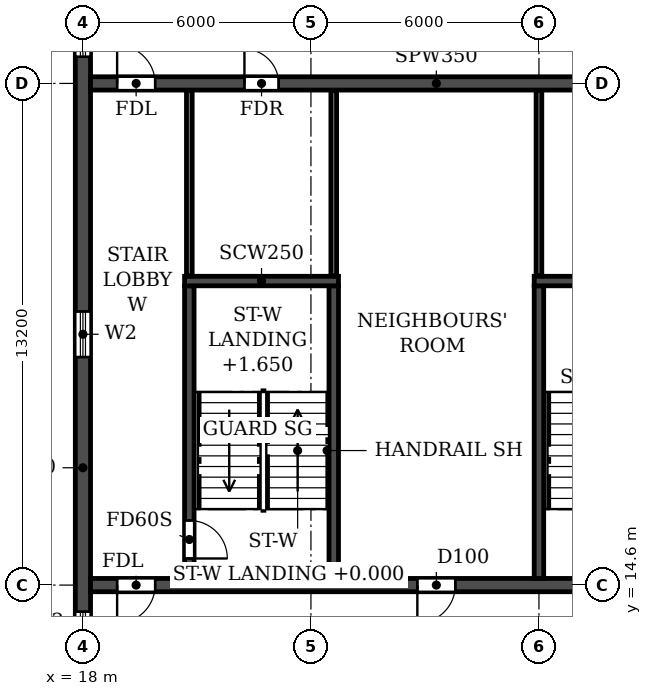
"""IFC4 building model, lengths in metres.
Left out: names, types, materials, properties, quantities, classifications, styles, units other than length and angle.
Written with IfcOpenShell. Run it as: python <this file> out.ifc"""

import sys

from ifc_helpers import new_model, si_unit, direction, frame, frame_2d, origin, place, context, subcontext, project, spatial, rectangle, extrude, element, fill, save


model = new_model("IFC4")
c1 = context("Model", 3, precision=1e-05, world=origin(), true_north=direction((0.0, 1.0)))
c2 = subcontext(c1, "Body", "Model", "MODEL_VIEW")
j1 = project(units=[si_unit("LENGTHUNIT", "METRE"), si_unit("PLANEANGLEUNIT", "RADIAN")], contexts=[c1])
p1 = place(None, origin())
s1 = spatial("IfcSite", under=j1, at=p1, CompositionType="ELEMENT")
p2 = place(p1, origin())
s2 = spatial("IfcBuilding", under=s1, at=p2, CompositionType="ELEMENT")
p3 = place(p2, frame((0.0, 0.0, 251.1)))
s3 = spatial("IfcBuildingStorey", under=s2, at=p3, CompositionType="ELEMENT", Elevation=251.1)
p4 = place(p3, frame((18.0, 4.683, 0.0), z_axis=(0.0, 0.0, 1.0), x_axis=(0.0, 1.0, 0.0)))
e1 = element("IfcWall", 1, at=p4, inside=s3, PredefinedType="SHEAR", context=c2, shape_type="SweptSolid", body=[
    extrude(rectangle(XDim=31.834, YDim=0.4, at=frame_2d((15.917, 0.0))), origin(), (0.0, 0.0, 1.0), 3.08),
])
p5 = place(p4, frame((23.817, 0.0, 0.9)))
e2 = element("IfcOpeningElement", 2, at=p5, cuts=e1, PredefinedType="OPENING", context=c2, shape_type="SweptSolid", body=[
    extrude(rectangle(XDim=1.2, YDim=1.5, at=frame_2d((0.6, 0.75))), frame((0.0, 0.21, 0.0), z_axis=(0.0, -1.0, 0.0), x_axis=(1.0, 0.0, 0.0)), (0.0, 0.0, 1.0), 0.42),
])
p6 = place(p4, frame((8.017, 0.0, 0.9)))
e3 = element("IfcOpeningElement", 3, at=p6, cuts=e1, PredefinedType="OPENING", context=c2, shape_type="SweptSolid", body=[
    extrude(rectangle(XDim=1.2, YDim=1.5, at=frame_2d((0.6, 0.75))), frame((0.0, 0.21, 0.0), z_axis=(0.0, -1.0, 0.0), x_axis=(1.0, 0.0, 0.0)), (0.0, 0.0, 1.0), 0.42),
])
p7 = place(p4, frame((27.694, 0.0, 0.6)))
e4 = element("IfcOpeningElement", 4, at=p7, cuts=e1, PredefinedType="OPENING", context=c2, shape_type="SweptSolid", body=[
    extrude(rectangle(XDim=2.2, YDim=1.8, at=frame_2d((1.1, 0.9))), frame((0.0, 0.21, 0.0), z_axis=(0.0, -1.0, 0.0), x_axis=(1.0, 0.0, 0.0)), (0.0, 0.0, 1.0), 0.42),
])
p8 = place(p4, frame((2.541, 0.0, 0.6)))
e5 = element("IfcOpeningElement", 5, at=p8, cuts=e1, PredefinedType="OPENING", context=c2, shape_type="SweptSolid", body=[
    extrude(rectangle(XDim=2.2, YDim=1.8, at=frame_2d((1.1, 0.9))), frame((0.0, 0.21, 0.0), z_axis=(0.0, -1.0, 0.0), x_axis=(1.0, 0.0, 0.0)), (0.0, 0.0, 1.0), 0.42),
])
p9 = place(p4, frame((15.917, 0.0, 0.9)))
e6 = element("IfcOpeningElement", 6, at=p9, cuts=e1, PredefinedType="OPENING", context=c2, shape_type="SweptSolid", body=[
    extrude(rectangle(XDim=1.2, YDim=1.5, at=frame_2d((0.6, 0.75))), frame((0.0, 0.21, 0.0), z_axis=(0.0, -1.0, 0.0), x_axis=(1.0, 0.0, 0.0)), (0.0, 0.0, 1.0), 0.42),
])
p10 = place(p3, frame((18.2, 14.6, 0.0), z_axis=(0.0, 0.0, 1.0), x_axis=(1.0, 0.0, 0.0)))
e7 = element("IfcWall", 7, at=p10, inside=s3, PredefinedType="SOLIDWALL", context=c2, shape_type="SweptSolid", body=[
    extrude(rectangle(XDim=65.6, YDim=0.35, at=frame_2d((32.8, 0.0))), origin(), (0.0, 0.0, 1.0), 3.08),
])
p11 = place(p10, frame((0.7, 0.0, 0.0)))
e8 = element("IfcOpeningElement", 8, at=p11, cuts=e7, PredefinedType="OPENING", context=c2, shape_type="SweptSolid", body=[
    extrude(rectangle(XDim=1.0, YDim=2.1, at=frame_2d((0.5, 1.05))), frame((0.0, 0.185, 0.0), z_axis=(0.0, -1.0, 0.0), x_axis=(1.0, 0.0, 0.0)), (0.0, 0.0, 1.0), 0.37),
])
p12 = place(p10, frame((8.6, 0.0, 0.0)))
e9 = element("IfcOpeningElement", 9, at=p12, cuts=e7, PredefinedType="OPENING", context=c2, shape_type="SweptSolid", body=[
    extrude(rectangle(XDim=1.0, YDim=2.1, at=frame_2d((0.5, 1.05))), frame((0.0, 0.185, 0.0), z_axis=(0.0, -1.0, 0.0), x_axis=(1.0, 0.0, 0.0)), (0.0, 0.0, 1.0), 0.37),
])
p13 = place(p10, frame((13.2, 0.0, 0.0)))
e10 = element("IfcOpeningElement", 10, at=p13, cuts=e7, PredefinedType="OPENING", context=c2, shape_type="SweptSolid", body=[
    extrude(rectangle(XDim=1.0, YDim=2.1, at=frame_2d((0.5, 1.05))), frame((0.0, 0.185, 0.0), z_axis=(0.0, -1.0, 0.0), x_axis=(1.0, 0.0, 0.0)), (0.0, 0.0, 1.0), 0.37),
])
p14 = place(p10, frame((24.5, 0.0, 0.0)))
e11 = element("IfcOpeningElement", 11, at=p14, cuts=e7, PredefinedType="OPENING", context=c2, shape_type="SweptSolid", body=[
    extrude(rectangle(XDim=1.0, YDim=2.1, at=frame_2d((0.5, 1.05))), frame((0.0, 0.185, 0.0), z_axis=(0.0, -1.0, 0.0), x_axis=(1.0, 0.0, 0.0)), (0.0, 0.0, 1.0), 0.37),
])
p15 = place(p10, frame((28.4, 0.0, 0.0)))
e12 = element("IfcOpeningElement", 12, at=p15, cuts=e7, PredefinedType="OPENING", context=c2, shape_type="SweptSolid", body=[
    extrude(rectangle(XDim=1.0, YDim=2.1, at=frame_2d((0.5, 1.05))), frame((0.0, 0.185, 0.0), z_axis=(0.0, -1.0, 0.0), x_axis=(1.0, 0.0, 0.0)), (0.0, 0.0, 1.0), 0.37),
])
p16 = place(p10, frame((32.3, 0.0, 0.0)))
e13 = element("IfcOpeningElement", 13, at=p16, cuts=e7, PredefinedType="OPENING", context=c2, shape_type="SweptSolid", body=[
    extrude(rectangle(XDim=1.0, YDim=2.1, at=frame_2d((0.5, 1.05))), frame((0.0, 0.185, 0.0), z_axis=(0.0, -1.0, 0.0), x_axis=(1.0, 0.0, 0.0)), (0.0, 0.0, 1.0), 0.37),
])
p17 = place(p10, frame((34.9, 0.0, 0.0)))
e14 = element("IfcOpeningElement", 14, at=p17, cuts=e7, PredefinedType="OPENING", context=c2, shape_type="SweptSolid", body=[
    extrude(rectangle(XDim=1.0, YDim=2.1, at=frame_2d((0.5, 1.05))), frame((0.0, 0.185, 0.0), z_axis=(0.0, -1.0, 0.0), x_axis=(1.0, 0.0, 0.0)), (0.0, 0.0, 1.0), 0.37),
])
p18 = place(p10, frame((38.8, 0.0, 0.0)))
e15 = element("IfcOpeningElement", 15, at=p18, cuts=e7, PredefinedType="OPENING", context=c2, shape_type="SweptSolid", body=[
    extrude(rectangle(XDim=1.0, YDim=2.1, at=frame_2d((0.5, 1.05))), frame((0.0, 0.185, 0.0), z_axis=(0.0, -1.0, 0.0), x_axis=(1.0, 0.0, 0.0)), (0.0, 0.0, 1.0), 0.37),
])
p19 = place(p10, frame((51.4, 0.0, 0.0)))
e16 = element("IfcOpeningElement", 16, at=p19, cuts=e7, PredefinedType="OPENING", context=c2, shape_type="SweptSolid", body=[
    extrude(rectangle(XDim=1.0, YDim=2.1, at=frame_2d((0.5, 1.05))), frame((0.0, 0.185, 0.0), z_axis=(0.0, -1.0, 0.0), x_axis=(1.0, 0.0, 0.0)), (0.0, 0.0, 1.0), 0.37),
])
p20 = place(p10, frame((56.0, 0.0, 0.0)))
e17 = element("IfcOpeningElement", 17, at=p20, cuts=e7, PredefinedType="OPENING", context=c2, shape_type="SweptSolid", body=[
    extrude(rectangle(XDim=1.0, YDim=2.1, at=frame_2d((0.5, 1.05))), frame((0.0, 0.185, 0.0), z_axis=(0.0, -1.0, 0.0), x_axis=(1.0, 0.0, 0.0)), (0.0, 0.0, 1.0), 0.37),
])
p21 = place(p10, frame((63.9, 0.0, 0.0)))
e18 = element("IfcOpeningElement", 18, at=p21, cuts=e7, PredefinedType="OPENING", context=c2, shape_type="SweptSolid", body=[
    extrude(rectangle(XDim=1.0, YDim=2.1, at=frame_2d((0.5, 1.05))), frame((0.0, 0.185, 0.0), z_axis=(0.0, -1.0, 0.0), x_axis=(1.0, 0.0, 0.0)), (0.0, 0.0, 1.0), 0.37),
])
p22 = place(p3, frame((18.2, 27.8, 0.0), z_axis=(0.0, 0.0, 1.0), x_axis=(1.0, 0.0, 0.0)))
e19 = element("IfcWall", 19, at=p22, inside=s3, PredefinedType="SOLIDWALL", context=c2, shape_type="SweptSolid", body=[
    extrude(rectangle(XDim=65.6, YDim=0.35, at=frame_2d((32.8, 0.0))), origin(), (0.0, 0.0, 1.0), 3.08),
])
p23 = place(p22, frame((0.7, 0.0, 0.0)))
e20 = element("IfcOpeningElement", 20, at=p23, cuts=e19, PredefinedType="OPENING", context=c2, shape_type="SweptSolid", body=[
    extrude(rectangle(XDim=1.0, YDim=2.1, at=frame_2d((0.5, 1.05))), frame((0.0, 0.185, 0.0), z_axis=(0.0, -1.0, 0.0), x_axis=(1.0, 0.0, 0.0)), (0.0, 0.0, 1.0), 0.37),
])
p24 = place(p22, frame((4.05, 0.0, 0.0)))
e21 = element("IfcOpeningElement", 21, at=p24, cuts=e19, PredefinedType="OPENING", context=c2, shape_type="SweptSolid", body=[
    extrude(rectangle(XDim=0.9, YDim=2.1, at=frame_2d((0.45, 1.05))), frame((0.0, 0.185, 0.0), z_axis=(0.0, -1.0, 0.0), x_axis=(1.0, 0.0, 0.0)), (0.0, 0.0, 1.0), 0.37),
])
p25 = place(p22, frame((13.25, 0.0, 0.0)))
e22 = element("IfcOpeningElement", 22, at=p25, cuts=e19, PredefinedType="OPENING", context=c2, shape_type="SweptSolid", body=[
    extrude(rectangle(XDim=0.9, YDim=2.1, at=frame_2d((0.45, 1.05))), frame((0.0, 0.185, 0.0), z_axis=(0.0, -1.0, 0.0), x_axis=(1.0, 0.0, 0.0)), (0.0, 0.0, 1.0), 0.37),
])
p26 = place(p22, frame((19.0, 0.0, 0.0)))
e23 = element("IfcOpeningElement", 23, at=p26, cuts=e19, PredefinedType="OPENING", context=c2, shape_type="SweptSolid", body=[
    extrude(rectangle(XDim=1.0, YDim=2.1, at=frame_2d((0.5, 1.05))), frame((0.0, 0.185, 0.0), z_axis=(0.0, -1.0, 0.0), x_axis=(1.0, 0.0, 0.0)), (0.0, 0.0, 1.0), 0.37),
])
p27 = place(p22, frame((24.2, 0.0, 0.0)))
e24 = element("IfcOpeningElement", 24, at=p27, cuts=e19, PredefinedType="OPENING", context=c2, shape_type="SweptSolid", body=[
    extrude(rectangle(XDim=1.0, YDim=2.1, at=frame_2d((0.5, 1.05))), frame((0.0, 0.185, 0.0), z_axis=(0.0, -1.0, 0.0), x_axis=(1.0, 0.0, 0.0)), (0.0, 0.0, 1.0), 0.37),
])
p28 = place(p22, frame((29.4, 0.0, 0.0)))
e25 = element("IfcOpeningElement", 25, at=p28, cuts=e19, PredefinedType="OPENING", context=c2, shape_type="SweptSolid", body=[
    extrude(rectangle(XDim=1.0, YDim=2.1, at=frame_2d((0.5, 1.05))), frame((0.0, 0.185, 0.0), z_axis=(0.0, -1.0, 0.0), x_axis=(1.0, 0.0, 0.0)), (0.0, 0.0, 1.0), 0.37),
])
p29 = place(p22, frame((32.3, 0.0, 0.0)))
e26 = element("IfcOpeningElement", 26, at=p29, cuts=e19, PredefinedType="OPENING", context=c2, shape_type="SweptSolid", body=[
    extrude(rectangle(XDim=1.0, YDim=2.1, at=frame_2d((0.5, 1.05))), frame((0.0, 0.185, 0.0), z_axis=(0.0, -1.0, 0.0), x_axis=(1.0, 0.0, 0.0)), (0.0, 0.0, 1.0), 0.37),
])
p30 = place(p22, frame((36.5, 0.0, 0.0)))
e27 = element("IfcOpeningElement", 27, at=p30, cuts=e19, PredefinedType="OPENING", context=c2, shape_type="SweptSolid", body=[
    extrude(rectangle(XDim=1.0, YDim=2.1, at=frame_2d((0.5, 1.05))), frame((0.0, 0.185, 0.0), z_axis=(0.0, -1.0, 0.0), x_axis=(1.0, 0.0, 0.0)), (0.0, 0.0, 1.0), 0.37),
])
p31 = place(p22, frame((40.4, 0.0, 0.0)))
e28 = element("IfcOpeningElement", 28, at=p31, cuts=e19, PredefinedType="OPENING", context=c2, shape_type="SweptSolid", body=[
    extrude(rectangle(XDim=1.0, YDim=2.1, at=frame_2d((0.5, 1.05))), frame((0.0, 0.185, 0.0), z_axis=(0.0, -1.0, 0.0), x_axis=(1.0, 0.0, 0.0)), (0.0, 0.0, 1.0), 0.37),
])
p32 = place(p22, frame((43.0, 0.0, 0.0)))
e29 = element("IfcOpeningElement", 29, at=p32, cuts=e19, PredefinedType="OPENING", context=c2, shape_type="SweptSolid", body=[
    extrude(rectangle(XDim=1.0, YDim=2.1, at=frame_2d((0.5, 1.05))), frame((0.0, 0.185, 0.0), z_axis=(0.0, -1.0, 0.0), x_axis=(1.0, 0.0, 0.0)), (0.0, 0.0, 1.0), 0.37),
])
p33 = place(p22, frame((46.65, 0.0, 0.0)))
e30 = element("IfcOpeningElement", 30, at=p33, cuts=e19, PredefinedType="OPENING", context=c2, shape_type="SweptSolid", body=[
    extrude(rectangle(XDim=1.5, YDim=2.1, at=frame_2d((0.75, 1.05))), frame((0.0, 0.185, 0.0), z_axis=(0.0, -1.0, 0.0), x_axis=(1.0, 0.0, 0.0)), (0.0, 0.0, 1.0), 0.37),
])
p34 = place(p22, frame((51.45, 0.0, 0.0)))
e31 = element("IfcOpeningElement", 31, at=p34, cuts=e19, PredefinedType="OPENING", context=c2, shape_type="SweptSolid", body=[
    extrude(rectangle(XDim=0.9, YDim=2.1, at=frame_2d((0.45, 1.05))), frame((0.0, 0.185, 0.0), z_axis=(0.0, -1.0, 0.0), x_axis=(1.0, 0.0, 0.0)), (0.0, 0.0, 1.0), 0.37),
])
p35 = place(p22, frame((60.65, 0.0, 0.0)))
e32 = element("IfcOpeningElement", 32, at=p35, cuts=e19, PredefinedType="OPENING", context=c2, shape_type="SweptSolid", body=[
    extrude(rectangle(XDim=0.9, YDim=2.1, at=frame_2d((0.45, 1.05))), frame((0.0, 0.185, 0.0), z_axis=(0.0, -1.0, 0.0), x_axis=(1.0, 0.0, 0.0)), (0.0, 0.0, 1.0), 0.37),
])
p36 = place(p22, frame((63.9, 0.0, 0.0)))
e33 = element("IfcOpeningElement", 33, at=p36, cuts=e19, PredefinedType="OPENING", context=c2, shape_type="SweptSolid", body=[
    extrude(rectangle(XDim=1.0, YDim=2.1, at=frame_2d((0.5, 1.05))), frame((0.0, 0.185, 0.0), z_axis=(0.0, -1.0, 0.0), x_axis=(1.0, 0.0, 0.0)), (0.0, 0.0, 1.0), 0.37),
])
p37 = place(p3, frame((30.0, 14.775, 0.0), z_axis=(0.0, 0.0, 1.0), x_axis=(0.0, 1.0, 0.0)))
e34 = element("IfcWall", 34, at=p37, inside=s3, PredefinedType="SOLIDWALL", context=c2, shape_type="SweptSolid", body=[
    extrude(rectangle(XDim=7.7, YDim=0.25, at=frame_2d((3.85, 0.0))), origin(), (0.0, 0.0, 1.0), 3.08),
])
p38 = place(p3, frame((29.875, 22.6, 0.0), z_axis=(0.0, 0.0, 1.0), x_axis=(1.0, 0.0, 0.0)))
e35 = element("IfcWall", 35, at=p38, inside=s3, PredefinedType="SOLIDWALL", context=c2, shape_type="SweptSolid", body=[
    extrude(rectangle(XDim=4.05, YDim=0.25, at=frame_2d((2.025, 0.0))), origin(), (0.0, 0.0, 1.0), 3.08),
])
p39 = place(p3, frame((20.8, 14.775, 0.0), z_axis=(0.0, 0.0, 1.0), x_axis=(0.0, 1.0, 0.0)))
e36 = element("IfcWall", 36, at=p39, inside=s3, PredefinedType="SOLIDWALL", context=c2, shape_type="SweptSolid", body=[
    extrude(rectangle(XDim=7.7, YDim=0.25, at=frame_2d((3.85, 0.0))), origin(), (0.0, 0.0, 1.0), 3.08),
])
p40 = place(p39, frame((0.525, 0.0, 0.0)))
e37 = element("IfcOpeningElement", 37, at=p40, cuts=e36, PredefinedType="OPENING", context=c2, shape_type="SweptSolid", body=[
    extrude(rectangle(XDim=1.0, YDim=2.1, at=frame_2d((0.5, 1.05))), frame((0.0, 0.135, 0.0), z_axis=(0.0, -1.0, 0.0), x_axis=(1.0, 0.0, 0.0)), (0.0, 0.0, 1.0), 0.27),
])
p41 = place(p3, frame((24.6, 14.775, 0.0), z_axis=(0.0, 0.0, 1.0), x_axis=(0.0, 1.0, 0.0)))
e38 = element("IfcWall", 38, at=p41, inside=s3, PredefinedType="SOLIDWALL", context=c2, shape_type="SweptSolid", body=[
    extrude(rectangle(XDim=7.7, YDim=0.25, at=frame_2d((3.85, 0.0))), origin(), (0.0, 0.0, 1.0), 3.08),
])
p42 = place(p3, frame((20.675, 22.6, 0.0), z_axis=(0.0, 0.0, 1.0), x_axis=(1.0, 0.0, 0.0)))
e39 = element("IfcWall", 39, at=p42, inside=s3, PredefinedType="SOLIDWALL", context=c2, shape_type="SweptSolid", body=[
    extrude(rectangle(XDim=4.05, YDim=0.25, at=frame_2d((2.025, 0.0))), origin(), (0.0, 0.0, 1.0), 3.08),
])
for number, where, z_axis, x_axis in (
    (40, (20.8, 22.735, 0.0), (0.0, 0.0, 1.0), (0.0, 1.0, 0.0)),
    (41, (24.6, 22.735, 0.0), (0.0, 0.0, 1.0), (0.0, 1.0, 0.0)),
    (42, (30.0, 22.735, 0.0), (0.0, 0.0, 1.0), (0.0, 1.0, 0.0)),
):
    element("IfcWall", number, at=place(p3, frame(where, z_axis=z_axis, x_axis=x_axis)), inside=s3, PredefinedType="PARTITIONING", context=c2, shape_type="SweptSolid", body=[
        extrude(rectangle(XDim=4.88, YDim=0.15, at=frame_2d((2.44, 0.0))), origin(), (0.0, 0.0, 1.0), 3.08),
    ])
p43 = place(p5, origin())
e43 = element("IfcWindow", 43, at=p43, inside=s3, PartitioningType="SINGLE_PANEL", PredefinedType="WINDOW", context=c2, shape_type="SweptSolid", body=[
    extrude(rectangle(XDim=1.2, YDim=1.5, at=frame_2d((0.6, 0.75))), frame((0.0, 0.03, 0.0), z_axis=(0.0, -1.0, 0.0), x_axis=(1.0, 0.0, 0.0)), (0.0, 0.0, 1.0), 0.06),
])
fill(e2, e43)
p44 = place(p6, origin())
e44 = element("IfcWindow", 44, at=p44, inside=s3, PartitioningType="SINGLE_PANEL", PredefinedType="WINDOW", context=c2, shape_type="SweptSolid", body=[
    extrude(rectangle(XDim=1.2, YDim=1.5, at=frame_2d((0.6, 0.75))), frame((0.0, 0.03, 0.0), z_axis=(0.0, -1.0, 0.0), x_axis=(1.0, 0.0, 0.0)), (0.0, 0.0, 1.0), 0.06),
])
fill(e3, e44)
p45 = place(p9, origin())
e45 = element("IfcWindow", 45, at=p45, inside=s3, PartitioningType="SINGLE_PANEL", PredefinedType="WINDOW", context=c2, shape_type="SweptSolid", body=[
    extrude(rectangle(XDim=1.2, YDim=1.5, at=frame_2d((0.6, 0.75))), frame((0.0, 0.03, 0.0), z_axis=(0.0, -1.0, 0.0), x_axis=(1.0, 0.0, 0.0)), (0.0, 0.0, 1.0), 0.06),
])
fill(e6, e45)
p46 = place(p23, origin())
e46 = element("IfcDoor", 46, at=p46, inside=s3, OperationType="SINGLE_SWING_LEFT", PredefinedType="DOOR", context=c2, shape_type="SweptSolid", body=[
    extrude(rectangle(XDim=1.0, YDim=2.1, at=frame_2d((0.5, 1.05))), frame((0.0, 0.025, 0.0), z_axis=(0.0, -1.0, 0.0), x_axis=(1.0, 0.0, 0.0)), (0.0, 0.0, 1.0), 0.05),
])
fill(e20, e46)
p47 = place(p24, origin())
e47 = element("IfcDoor", 47, at=p47, inside=s3, OperationType="SINGLE_SWING_LEFT", PredefinedType="DOOR", context=c2, shape_type="SweptSolid", body=[
    extrude(rectangle(XDim=0.9, YDim=2.1, at=frame_2d((0.45, 1.05))), frame((0.0, 0.025, 0.0), z_axis=(0.0, -1.0, 0.0), x_axis=(1.0, 0.0, 0.0)), (0.0, 0.0, 1.0), 0.05),
])
fill(e21, e47)
p48 = place(p11, frame((1.0, 0.0, 0.0), z_axis=(0.0, 0.0, 1.0), x_axis=(-1.0, 0.0, 0.0)))
e48 = element("IfcDoor", 48, at=p48, inside=s3, OperationType="SINGLE_SWING_RIGHT", PredefinedType="DOOR", context=c2, shape_type="SweptSolid", body=[
    extrude(rectangle(XDim=1.0, YDim=2.1, at=frame_2d((0.5, 1.05))), frame((0.0, 0.025, 0.0), z_axis=(0.0, -1.0, 0.0), x_axis=(1.0, 0.0, 0.0)), (0.0, 0.0, 1.0), 0.05),
])
fill(e8, e48)
p49 = place(p12, frame((1.0, 0.0, 0.0), z_axis=(0.0, 0.0, 1.0), x_axis=(-1.0, 0.0, 0.0)))
e49 = element("IfcDoor", 49, at=p49, inside=s3, OperationType="SINGLE_SWING_RIGHT", PredefinedType="DOOR", context=c2, shape_type="SweptSolid", body=[
    extrude(rectangle(XDim=1.0, YDim=2.1, at=frame_2d((0.5, 1.05))), frame((0.0, 0.025, 0.0), z_axis=(0.0, -1.0, 0.0), x_axis=(1.0, 0.0, 0.0)), (0.0, 0.0, 1.0), 0.05),
])
fill(e9, e49)
p50 = place(p40, frame((1.0, 0.0, 0.0), z_axis=(0.0, 0.0, 1.0), x_axis=(-1.0, 0.0, 0.0)))
e50 = element("IfcDoor", 50, at=p50, inside=s3, OperationType="SINGLE_SWING_RIGHT", PredefinedType="DOOR", context=c2, shape_type="SweptSolid", body=[
    extrude(rectangle(XDim=1.0, YDim=2.1, at=frame_2d((0.5, 1.05))), frame((0.0, 0.025, 0.0), z_axis=(0.0, -1.0, 0.0), x_axis=(1.0, 0.0, 0.0)), (0.0, 0.0, 1.0), 0.05),
])
fill(e37, e50)
save(model, sys.argv[1])
